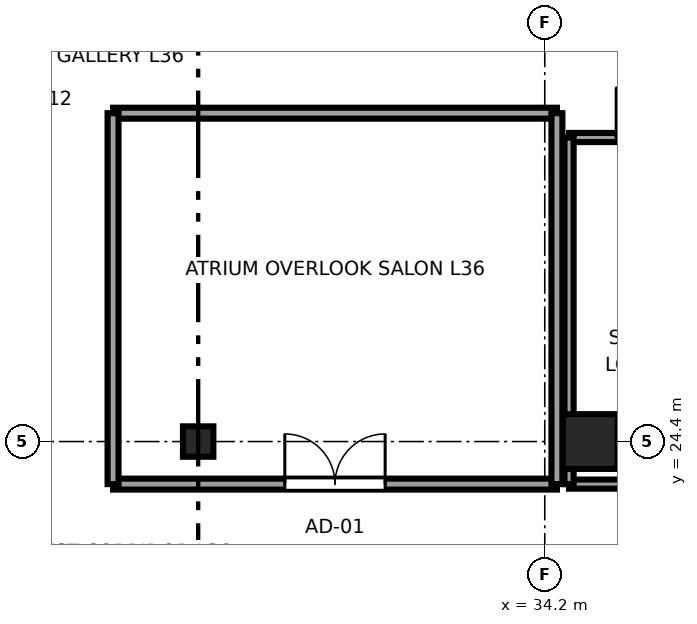
"""IFC4 building model, lengths in metres.
Left out: names, types, materials, properties, quantities, classifications, styles, units other than length and angle.
Written with IfcOpenShell. Run it as: python <this file> out.ifc"""

import sys

from ifc_helpers import new_model, si_unit, direction, frame, frame_2d, origin, origin_2d, place, context, subcontext, project, spatial, rectangle, i_section, extrude, source, transform, mapped, element, fill, save


model = new_model("IFC4")
c1 = context("Model", 3, precision=1e-05, world=origin(), true_north=direction((0.0, 1.0)))
c2 = subcontext(c1, "Body", "Model", "MODEL_VIEW")
j1 = project(units=[si_unit("LENGTHUNIT", "METRE"), si_unit("PLANEANGLEUNIT", "RADIAN")], contexts=[c1])
p1 = place(None, origin())
s1 = spatial("IfcSite", under=j1, at=p1, CompositionType="ELEMENT")
p2 = place(p1, origin())
s2 = spatial("IfcBuilding", under=s1, at=p2, CompositionType="ELEMENT")
p3 = place(p2, frame((0.0, 0.0, 139.95)))
s3 = spatial("IfcBuildingStorey", under=s2, at=p3, CompositionType="ELEMENT", Elevation=139.95)
m1 = source(origin(), c2, "Body", "SweptSolid", [
    extrude(rectangle(XDim=0.9, YDim=0.9, at=origin_2d()), origin(), (0.0, 0.0, 1.0), 3.55),
])
p4 = place(p3, frame((34.95, 24.4, 0.0), z_axis=(0.0, 0.0, 1.0), x_axis=(1.0, 0.0, 0.0)))
e1 = element("IfcColumn", 1, at=p4, inside=s3, PredefinedType="COLUMN", context=c2, shape_type="MappedRepresentation", body=[
    mapped(m1, transform((0.0, 0.0, 0.0), x_axis=(1.0, 0.0, 0.0), y_axis=(0.0, 1.0, 0.0), z_axis=(0.0, 0.0, 1.0), scale=1.0)),
])
m2 = source(origin(), c2, "Body", "SweptSolid", [
    extrude(i_section(OverallWidth=0.5, OverallDepth=0.5, WebThickness=0.022, FlangeThickness=0.034, at=origin_2d()), origin(), (0.0, 0.0, 1.0), 3.55),
])
p5 = place(p3, frame((28.5, 24.4, 0.0), z_axis=(0.0, 0.0, 1.0), x_axis=(1.0, 0.0, 0.0)))
e2 = element("IfcColumn", 2, at=p5, inside=s3, PredefinedType="COLUMN", context=c2, shape_type="MappedRepresentation", body=[
    mapped(m2, transform((0.0, 0.0, 0.0), x_axis=(1.0, 0.0, 0.0), y_axis=(0.0, 1.0, 0.0), z_axis=(0.0, 0.0, 1.0), scale=1.0)),
])
p6 = place(p3, frame((27.1, 23.7, 0.0), z_axis=(0.0, 0.0, 1.0), x_axis=(1.0, 0.0, 0.0)))
e3 = element("IfcWall", 3, at=p6, inside=s3, PredefinedType="PARTITIONING", context=c2, shape_type="SweptSolid", body=[
    extrude(rectangle(XDim=7.3, YDim=0.18, at=frame_2d((3.65, 0.0))), origin(), (0.0, 0.0, 1.0), 3.37),
])
p7 = place(p6, frame((2.825, 0.0, 0.0)))
e4 = element("IfcOpeningElement", 4, at=p7, cuts=e3, PredefinedType="OPENING", context=c2, shape_type="SweptSolid", body=[
    extrude(rectangle(XDim=1.65, YDim=2.15, at=frame_2d((0.825, 1.075))), frame((0.0, 0.1, 0.0), z_axis=(0.0, -1.0, 0.0), x_axis=(1.0, 0.0, 0.0)), (0.0, 0.0, 1.0), 0.2),
])
p8 = place(p3, frame((27.1, 29.8, 0.0), z_axis=(0.0, 0.0, 1.0), x_axis=(1.0, 0.0, 0.0)))
e5 = element("IfcWall", 5, at=p8, inside=s3, PredefinedType="PARTITIONING", context=c2, shape_type="SweptSolid", body=[
    extrude(rectangle(XDim=7.3, YDim=0.18, at=frame_2d((3.65, 0.0))), origin(), (0.0, 0.0, 1.0), 3.37),
])
for number, where, z_axis, x_axis in (
    (6, (27.1, 23.7, 0.0), (0.0, 0.0, 1.0), (0.0, 1.0, 0.0)),
    (7, (34.4, 23.7, 0.0), (0.0, 0.0, 1.0), (0.0, 1.0, 0.0)),
):
    element("IfcWall", number, at=place(p3, frame(where, z_axis=z_axis, x_axis=x_axis)), inside=s3, PredefinedType="PARTITIONING", context=c2, shape_type="SweptSolid", body=[
        extrude(rectangle(XDim=6.1, YDim=0.18, at=frame_2d((3.05, 0.0))), origin(), (0.0, 0.0, 1.0), 3.37),
    ])
p9 = place(p3, frame((34.6, 23.7, 0.0), z_axis=(0.0, 0.0, 1.0), x_axis=(1.0, 0.0, 0.0)))
e8 = element("IfcWall", 8, at=p9, inside=s3, PredefinedType="PARTITIONING", context=c2, shape_type="SweptSolid", body=[
    extrude(rectangle(XDim=3.2, YDim=0.15, at=frame_2d((1.6, 0.0))), origin(), (0.0, 0.0, 1.0), 3.37),
])
p10 = place(p3, frame((34.6, 29.4, 0.0), z_axis=(0.0, 0.0, 1.0), x_axis=(1.0, 0.0, 0.0)))
e9 = element("IfcWall", 9, at=p10, inside=s3, PredefinedType="PARTITIONING", context=c2, shape_type="SweptSolid", body=[
    extrude(rectangle(XDim=3.2, YDim=0.15, at=frame_2d((1.6, 0.0))), origin(), (0.0, 0.0, 1.0), 3.37),
])
p11 = place(p10, frame((0.775, 0.0, 0.0)))
e10 = element("IfcOpeningElement", 10, at=p11, cuts=e9, PredefinedType="OPENING", context=c2, shape_type="SweptSolid", body=[
    extrude(rectangle(XDim=1.65, YDim=2.15, at=frame_2d((0.825, 1.075))), frame((0.0, 0.085, 0.0), z_axis=(0.0, -1.0, 0.0), x_axis=(1.0, 0.0, 0.0)), (0.0, 0.0, 1.0), 0.17),
])
p12 = place(p3, frame((34.6, 23.7, 0.0), z_axis=(0.0, 0.0, 1.0), x_axis=(0.0, 1.0, 0.0)))
e11 = element("IfcWall", 11, at=p12, inside=s3, PredefinedType="PARTITIONING", context=c2, shape_type="SweptSolid", body=[
    extrude(rectangle(XDim=5.7, YDim=0.15, at=frame_2d((2.85, 0.0))), origin(), (0.0, 0.0, 1.0), 3.37),
])
m3 = source(origin(), c2, "Body", "SweptSolid", [
    extrude(rectangle(XDim=1.65, YDim=2.15, at=frame_2d((0.825, 1.075))), frame((0.0, 0.025, 0.0), z_axis=(0.0, -1.0, 0.0), x_axis=(1.0, 0.0, 0.0)), (0.0, 0.0, 1.0), 0.05),
])
p13 = place(p7, origin())
e12 = element("IfcDoor", 12, at=p13, inside=s3, OperationType="DOUBLE_DOOR_SINGLE_SWING", PredefinedType="DOOR", context=c2, shape_type="MappedRepresentation", body=[
    mapped(m3, transform((0.0, 0.0, 0.0), x_axis=(1.0, 0.0, 0.0), y_axis=(0.0, 1.0, 0.0), z_axis=(0.0, 0.0, 1.0), scale=1.0)),
])
fill(e4, e12)
p14 = place(p11, origin())
e13 = element("IfcDoor", 13, at=p14, inside=s3, OperationType="DOUBLE_DOOR_SINGLE_SWING", PredefinedType="DOOR", context=c2, shape_type="MappedRepresentation", body=[
    mapped(m3, transform((0.0, 0.0, 0.0), x_axis=(1.0, 0.0, 0.0), y_axis=(0.0, 1.0, 0.0), z_axis=(0.0, 0.0, 1.0), scale=1.0)),
])
fill(e10, e13)
save(model, sys.argv[1])
